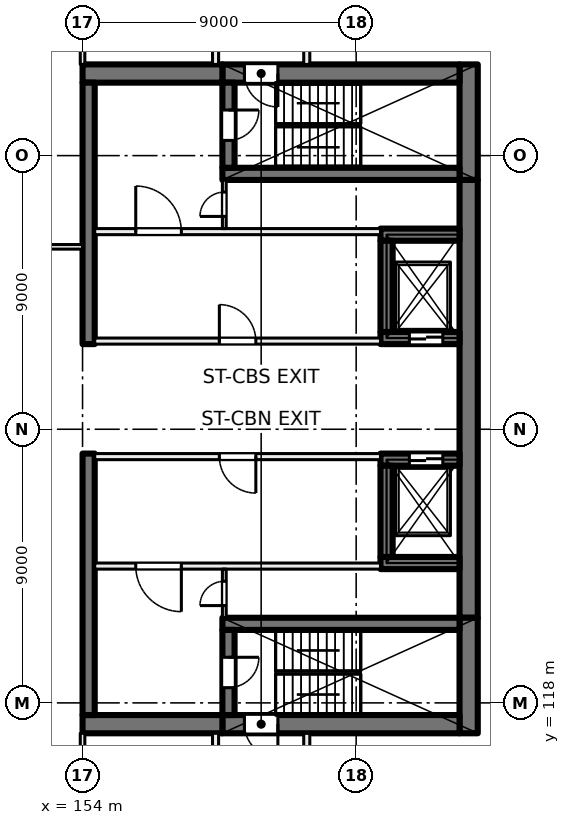
"""IFC4 building model, lengths in metres.
Left out: names, types, materials, properties, quantities, classifications, styles, units other than length and angle.
Written with IfcOpenShell. Run it as: python <this file> out.ifc"""

import sys

from ifc_helpers import new_model, si_unit, direction, frame, frame_2d, origin, place, context, subcontext, project, spatial, rectangle, extrude, element, fill, save


model = new_model("IFC4")
c1 = context("Model", 3, precision=1e-05, world=origin(), true_north=direction((0.0, 1.0)))
c2 = subcontext(c1, "Body", "Model", "MODEL_VIEW")
j1 = project(units=[si_unit("LENGTHUNIT", "METRE"), si_unit("PLANEANGLEUNIT", "RADIAN")], contexts=[c1])
p1 = place(None, origin())
s1 = spatial("IfcSite", under=j1, at=p1, CompositionType="ELEMENT")
p2 = place(p1, origin())
s2 = spatial("IfcBuilding", under=s1, at=p2, CompositionType="ELEMENT")
p3 = place(p2, origin())
s3 = spatial("IfcBuildingStorey", under=s2, at=p3, CompositionType="ELEMENT", Elevation=0.0)
p4 = place(p3, frame((166.7, 139.0, 0.0), z_axis=(0.0, 0.0, 1.0), x_axis=(0.0, -1.0, 0.0)))
e1 = element("IfcWall", 1, at=p4, inside=s3, PredefinedType="SHEAR", context=c2, shape_type="SweptSolid", body=[
    extrude(rectangle(XDim=3.8, YDim=0.6, at=frame_2d((1.9, 0.0))), origin(), (0.0, 0.0, 1.0), 7.5),
])
p5 = place(p3, frame((166.7, 135.2, 0.0), z_axis=(0.0, 0.0, 1.0), x_axis=(0.0, -1.0, 0.0)))
e2 = element("IfcWall", 2, at=p5, inside=s3, PredefinedType="SHEAR", context=c2, shape_type="SweptSolid", body=[
    extrude(rectangle(XDim=14.4, YDim=0.6, at=frame_2d((7.2, 0.0))), origin(), (0.0, 0.0, 1.0), 7.5),
])
p6 = place(p3, frame((166.7, 120.8, 0.0), z_axis=(0.0, 0.0, 1.0), x_axis=(0.0, -1.0, 0.0)))
e3 = element("IfcWall", 3, at=p6, inside=s3, PredefinedType="SHEAR", context=c2, shape_type="SweptSolid", body=[
    extrude(rectangle(XDim=3.8, YDim=0.6, at=frame_2d((1.9, 0.0))), origin(), (0.0, 0.0, 1.0), 7.5),
])
p7 = place(p3, frame((166.4, 138.7, 0.0), z_axis=(0.0, 0.0, 1.0), x_axis=(-1.0, 0.0, 0.0)))
e4 = element("IfcWall", 4, at=p7, inside=s3, PredefinedType="SHEAR", context=c2, shape_type="SweptSolid", body=[
    extrude(rectangle(XDim=7.8, YDim=0.6, at=frame_2d((3.9, 0.0))), origin(), (0.0, 0.0, 1.0), 7.5),
])
p8 = place(p7, frame((5.975, 0.0, 0.0)))
e5 = element("IfcOpeningElement", 5, at=p8, cuts=e4, PredefinedType="OPENING", context=c2, shape_type="SweptSolid", body=[
    extrude(rectangle(XDim=1.1, YDim=2.1, at=frame_2d((0.55, 1.05))), frame((0.0, 0.31, 0.0), z_axis=(0.0, -1.0, 0.0), x_axis=(1.0, 0.0, 0.0)), (0.0, 0.0, 1.0), 0.62),
])
p9 = place(p3, frame((166.4, 117.3, 0.0), z_axis=(0.0, 0.0, 1.0), x_axis=(-1.0, 0.0, 0.0)))
e6 = element("IfcWall", 6, at=p9, inside=s3, PredefinedType="SHEAR", context=c2, shape_type="SweptSolid", body=[
    extrude(rectangle(XDim=7.8, YDim=0.6, at=frame_2d((3.9, 0.0))), origin(), (0.0, 0.0, 1.0), 7.5),
])
p10 = place(p9, frame((5.975, 0.0, 0.0)))
e7 = element("IfcOpeningElement", 7, at=p10, cuts=e6, PredefinedType="OPENING", context=c2, shape_type="SweptSolid", body=[
    extrude(rectangle(XDim=1.1, YDim=2.1, at=frame_2d((0.55, 1.05))), frame((0.0, 0.31, 0.0), z_axis=(0.0, -1.0, 0.0), x_axis=(1.0, 0.0, 0.0)), (0.0, 0.0, 1.0), 0.62),
])
for number, where, z_axis, x_axis in (
    (8, (158.6, 138.7, 0.0), (0.0, 0.0, 1.0), (-1.0, 0.0, 0.0)),
    (9, (158.6, 117.3, 0.0), (0.0, 0.0, 1.0), (-1.0, 0.0, 0.0)),
):
    element("IfcWall", number, at=place(p3, frame(where, z_axis=z_axis, x_axis=x_axis)), inside=s3, PredefinedType="SHEAR", context=c2, shape_type="SweptSolid", body=[
        extrude(rectangle(XDim=4.6, YDim=0.6, at=frame_2d((2.3, 0.0))), origin(), (0.0, 0.0, 1.0), 7.5),
    ])
p11 = place(p3, frame((166.4, 135.4, 0.0), z_axis=(0.0, 0.0, 1.0), x_axis=(-1.0, 0.0, 0.0)))
e10 = element("IfcWall", 10, at=p11, inside=s3, PredefinedType="SHEAR", context=c2, shape_type="SweptSolid", body=[
    extrude(rectangle(XDim=7.8, YDim=0.4, at=frame_2d((3.9, 0.0))), origin(), (0.0, 0.0, 1.0), 7.5),
])
p12 = place(p3, frame((158.8, 138.4, 0.0), z_axis=(0.0, 0.0, 1.0), x_axis=(0.0, -1.0, 0.0)))
e11 = element("IfcWall", 11, at=p12, inside=s3, PredefinedType="SHEAR", context=c2, shape_type="SweptSolid", body=[
    extrude(rectangle(XDim=2.8, YDim=0.4, at=frame_2d((1.4, 0.0))), origin(), (0.0, 0.0, 1.0), 7.5),
])
p13 = place(p12, frame((0.9, 0.0, 0.0)))
e12 = element("IfcOpeningElement", 12, at=p13, cuts=e11, PredefinedType="OPENING", context=c2, shape_type="SweptSolid", body=[
    extrude(rectangle(XDim=1.0, YDim=2.1, at=frame_2d((0.5, 1.05))), frame((0.0, 0.21, 0.0), z_axis=(0.0, -1.0, 0.0), x_axis=(1.0, 0.0, 0.0)), (0.0, 0.0, 1.0), 0.42),
])
p14 = place(p3, frame((166.4, 120.6, 0.0), z_axis=(0.0, 0.0, 1.0), x_axis=(-1.0, 0.0, 0.0)))
e13 = element("IfcWall", 13, at=p14, inside=s3, PredefinedType="SHEAR", context=c2, shape_type="SweptSolid", body=[
    extrude(rectangle(XDim=7.8, YDim=0.4, at=frame_2d((3.9, 0.0))), origin(), (0.0, 0.0, 1.0), 7.5),
])
p15 = place(p3, frame((158.8, 120.4, 0.0), z_axis=(0.0, 0.0, 1.0), x_axis=(0.0, -1.0, 0.0)))
e14 = element("IfcWall", 14, at=p15, inside=s3, PredefinedType="SHEAR", context=c2, shape_type="SweptSolid", body=[
    extrude(rectangle(XDim=2.8, YDim=0.4, at=frame_2d((1.4, 0.0))), origin(), (0.0, 0.0, 1.0), 7.5),
])
p16 = place(p15, frame((0.9, 0.0, 0.0)))
e15 = element("IfcOpeningElement", 15, at=p16, cuts=e14, PredefinedType="OPENING", context=c2, shape_type="SweptSolid", body=[
    extrude(rectangle(XDim=1.0, YDim=2.1, at=frame_2d((0.5, 1.05))), frame((0.0, 0.21, 0.0), z_axis=(0.0, -1.0, 0.0), x_axis=(1.0, 0.0, 0.0)), (0.0, 0.0, 1.0), 0.42),
])
p17 = place(p3, frame((166.4, 130.0, 0.0), z_axis=(0.0, 0.0, 1.0), x_axis=(-1.0, 0.0, 0.0)))
e16 = element("IfcWall", 16, at=p17, inside=s3, PredefinedType="SHEAR", context=c2, shape_type="SweptSolid", body=[
    extrude(rectangle(XDim=2.6, YDim=0.4, at=frame_2d((1.3, 0.0))), origin(), (0.0, 0.0, 1.0), 7.5),
])
p18 = place(p17, frame((0.55, 0.0, 0.0)))
e17 = element("IfcOpeningElement", 17, at=p18, cuts=e16, PredefinedType="OPENING", context=c2, shape_type="SweptSolid", body=[
    extrude(rectangle(XDim=1.1, YDim=2.1, at=frame_2d((0.55, 1.05))), frame((0.0, 0.21, 0.0), z_axis=(0.0, -1.0, 0.0), x_axis=(1.0, 0.0, 0.0)), (0.0, 0.0, 1.0), 0.42),
])
p19 = place(p3, frame((166.4, 133.4, 0.0), z_axis=(0.0, 0.0, 1.0), x_axis=(-1.0, 0.0, 0.0)))
e18 = element("IfcWall", 18, at=p19, inside=s3, PredefinedType="SHEAR", context=c2, shape_type="SweptSolid", body=[
    extrude(rectangle(XDim=2.6, YDim=0.4, at=frame_2d((1.3, 0.0))), origin(), (0.0, 0.0, 1.0), 7.5),
])
p20 = place(p3, frame((164.0, 133.2, 0.0), z_axis=(0.0, 0.0, 1.0), x_axis=(0.0, -1.0, 0.0)))
e19 = element("IfcWall", 19, at=p20, inside=s3, PredefinedType="SHEAR", context=c2, shape_type="SweptSolid", body=[
    extrude(rectangle(XDim=3.0, YDim=0.4, at=frame_2d((1.5, 0.0))), origin(), (0.0, 0.0, 1.0), 7.5),
])
p21 = place(p3, frame((166.4, 126.0, 0.0), z_axis=(0.0, 0.0, 1.0), x_axis=(-1.0, 0.0, 0.0)))
e20 = element("IfcWall", 20, at=p21, inside=s3, PredefinedType="SHEAR", context=c2, shape_type="SweptSolid", body=[
    extrude(rectangle(XDim=2.6, YDim=0.4, at=frame_2d((1.3, 0.0))), origin(), (0.0, 0.0, 1.0), 7.5),
])
p22 = place(p21, frame((0.55, 0.0, 0.0)))
e21 = element("IfcOpeningElement", 21, at=p22, cuts=e20, PredefinedType="OPENING", context=c2, shape_type="SweptSolid", body=[
    extrude(rectangle(XDim=1.1, YDim=2.1, at=frame_2d((0.55, 1.05))), frame((0.0, 0.21, 0.0), z_axis=(0.0, -1.0, 0.0), x_axis=(1.0, 0.0, 0.0)), (0.0, 0.0, 1.0), 0.42),
])
p23 = place(p3, frame((166.4, 122.6, 0.0), z_axis=(0.0, 0.0, 1.0), x_axis=(-1.0, 0.0, 0.0)))
e22 = element("IfcWall", 22, at=p23, inside=s3, PredefinedType="SHEAR", context=c2, shape_type="SweptSolid", body=[
    extrude(rectangle(XDim=2.6, YDim=0.4, at=frame_2d((1.3, 0.0))), origin(), (0.0, 0.0, 1.0), 7.5),
])
p24 = place(p3, frame((164.0, 125.8, 0.0), z_axis=(0.0, 0.0, 1.0), x_axis=(0.0, -1.0, 0.0)))
e23 = element("IfcWall", 23, at=p24, inside=s3, PredefinedType="SHEAR", context=c2, shape_type="SweptSolid", body=[
    extrude(rectangle(XDim=3.0, YDim=0.4, at=frame_2d((1.5, 0.0))), origin(), (0.0, 0.0, 1.0), 7.5),
])
for number, where, z_axis, x_axis in (
    (24, (154.2, 138.4, 0.0), (0.0, 0.0, 1.0), (0.0, -1.0, 0.0)),
    (25, (154.2, 126.2, 0.0), (0.0, 0.0, 1.0), (0.0, -1.0, 0.0)),
):
    element("IfcWall", number, at=place(p3, frame(where, z_axis=z_axis, x_axis=x_axis)), inside=s3, PredefinedType="SHEAR", context=c2, shape_type="SweptSolid", body=[
        extrude(rectangle(XDim=8.6, YDim=0.4, at=frame_2d((4.3, 0.0))), origin(), (0.0, 0.0, 1.0), 7.5),
    ])
p25 = place(p3, frame((163.8, 126.1, 0.0), z_axis=(0.0, 0.0, 1.0), x_axis=(-1.0, 0.0, 0.0)))
e26 = element("IfcWall", 26, at=p25, inside=s3, PredefinedType="PARTITIONING", context=c2, shape_type="SweptSolid", body=[
    extrude(rectangle(XDim=9.4, YDim=0.2, at=frame_2d((4.7, 0.0))), origin(), (0.0, 0.0, 1.0), 7.1),
])
p26 = place(p25, frame((4.1, 0.0, 0.0)))
e27 = element("IfcOpeningElement", 27, at=p26, cuts=e26, PredefinedType="OPENING", context=c2, shape_type="SweptSolid", body=[
    extrude(rectangle(XDim=1.2, YDim=2.1, at=frame_2d((0.6, 1.05))), frame((0.0, 0.11, 0.0), z_axis=(0.0, -1.0, 0.0), x_axis=(1.0, 0.0, 0.0)), (0.0, 0.0, 1.0), 0.22),
])
p27 = place(p3, frame((163.8, 122.5, 0.0), z_axis=(0.0, 0.0, 1.0), x_axis=(-1.0, 0.0, 0.0)))
e28 = element("IfcWall", 28, at=p27, inside=s3, PredefinedType="PARTITIONING", context=c2, shape_type="SweptSolid", body=[
    extrude(rectangle(XDim=9.4, YDim=0.2, at=frame_2d((4.7, 0.0))), origin(), (0.0, 0.0, 1.0), 7.1),
])
p28 = place(p27, frame((6.55, 0.0, 0.0)))
e29 = element("IfcOpeningElement", 29, at=p28, cuts=e28, PredefinedType="OPENING", context=c2, shape_type="SweptSolid", body=[
    extrude(rectangle(XDim=1.5, YDim=2.1, at=frame_2d((0.75, 1.05))), frame((0.0, 0.11, 0.0), z_axis=(0.0, -1.0, 0.0), x_axis=(1.0, 0.0, 0.0)), (0.0, 0.0, 1.0), 0.22),
])
p29 = place(p3, frame((158.663, 120.8, 0.0), z_axis=(0.0, 0.0, 1.0), x_axis=(0.0, 1.0, 0.0)))
e30 = element("IfcWall", 30, at=p29, inside=s3, PredefinedType="PARTITIONING", context=c2, shape_type="SweptSolid", body=[
    extrude(rectangle(XDim=1.6, YDim=0.125, at=frame_2d((0.8, 0.0))), origin(), (0.0, 0.0, 1.0), 7.1),
])
p30 = place(p29, frame((0.4, 0.0, 0.0)))
e31 = element("IfcOpeningElement", 31, at=p30, cuts=e30, PredefinedType="OPENING", context=c2, shape_type="SweptSolid", body=[
    extrude(rectangle(XDim=0.8, YDim=2.1, at=frame_2d((0.4, 1.05))), frame((0.0, 0.073, 0.0), z_axis=(0.0, -1.0, 0.0), x_axis=(1.0, 0.0, 0.0)), (0.0, 0.0, 1.0), 0.145),
])
p31 = place(p3, frame((154.4, 129.9, 0.0), z_axis=(0.0, 0.0, 1.0), x_axis=(1.0, 0.0, 0.0)))
e32 = element("IfcWall", 32, at=p31, inside=s3, PredefinedType="PARTITIONING", context=c2, shape_type="SweptSolid", body=[
    extrude(rectangle(XDim=9.4, YDim=0.2, at=frame_2d((4.7, 0.0))), origin(), (0.0, 0.0, 1.0), 7.1),
])
p32 = place(p31, frame((4.1, 0.0, 0.0)))
e33 = element("IfcOpeningElement", 33, at=p32, cuts=e32, PredefinedType="OPENING", context=c2, shape_type="SweptSolid", body=[
    extrude(rectangle(XDim=1.2, YDim=2.1, at=frame_2d((0.6, 1.05))), frame((0.0, 0.11, 0.0), z_axis=(0.0, -1.0, 0.0), x_axis=(1.0, 0.0, 0.0)), (0.0, 0.0, 1.0), 0.22),
])
p33 = place(p3, frame((154.4, 133.5, 0.0), z_axis=(0.0, 0.0, 1.0), x_axis=(1.0, 0.0, 0.0)))
e34 = element("IfcWall", 34, at=p33, inside=s3, PredefinedType="PARTITIONING", context=c2, shape_type="SweptSolid", body=[
    extrude(rectangle(XDim=9.4, YDim=0.2, at=frame_2d((4.7, 0.0))), origin(), (0.0, 0.0, 1.0), 7.1),
])
p34 = place(p33, frame((1.35, 0.0, 0.0)))
e35 = element("IfcOpeningElement", 35, at=p34, cuts=e34, PredefinedType="OPENING", context=c2, shape_type="SweptSolid", body=[
    extrude(rectangle(XDim=1.5, YDim=2.1, at=frame_2d((0.75, 1.05))), frame((0.0, 0.11, 0.0), z_axis=(0.0, -1.0, 0.0), x_axis=(1.0, 0.0, 0.0)), (0.0, 0.0, 1.0), 0.22),
])
p35 = place(p3, frame((158.663, 133.6, 0.0), z_axis=(0.0, 0.0, 1.0), x_axis=(0.0, 1.0, 0.0)))
e36 = element("IfcWall", 36, at=p35, inside=s3, PredefinedType="PARTITIONING", context=c2, shape_type="SweptSolid", body=[
    extrude(rectangle(XDim=1.6, YDim=0.125, at=frame_2d((0.8, 0.0))), origin(), (0.0, 0.0, 1.0), 7.1),
])
p36 = place(p35, frame((0.4, 0.0, 0.0)))
e37 = element("IfcOpeningElement", 37, at=p36, cuts=e36, PredefinedType="OPENING", context=c2, shape_type="SweptSolid", body=[
    extrude(rectangle(XDim=0.8, YDim=2.1, at=frame_2d((0.4, 1.05))), frame((0.0, 0.073, 0.0), z_axis=(0.0, -1.0, 0.0), x_axis=(1.0, 0.0, 0.0)), (0.0, 0.0, 1.0), 0.145),
])
p37 = place(p3, frame((140.0, 133.0, 0.0), z_axis=(0.0, 0.0, 1.0), x_axis=(1.0, 0.0, 0.0)))
e38 = element("IfcWall", 38, at=p37, inside=s3, PredefinedType="PARTITIONING", context=c2, shape_type="SweptSolid", body=[
    extrude(rectangle(XDim=14.0, YDim=0.15, at=frame_2d((7.0, 0.0))), origin(), (0.0, 0.0, 1.0), 7.1),
])
p38 = place(p37, frame((6.1, 0.0, 0.0)))
e39 = element("IfcOpeningElement", 39, at=p38, cuts=e38, PredefinedType="OPENING", context=c2, shape_type="SweptSolid", body=[
    extrude(rectangle(XDim=1.8, YDim=2.1, at=frame_2d((0.9, 1.05))), frame((0.0, 0.085, 0.0), z_axis=(0.0, -1.0, 0.0), x_axis=(1.0, 0.0, 0.0)), (0.0, 0.0, 1.0), 0.17),
])
p39 = place(p3, frame((154.0, 117.0, 0.0), z_axis=(0.0, 0.0, 1.0), x_axis=(0.0, -1.0, 0.0)))
e40 = element("IfcWall", 40, at=p39, inside=s3, PredefinedType="PARTITIONING", context=c2, shape_type="SweptSolid", body=[
    extrude(rectangle(XDim=13.925, YDim=0.15, at=frame_2d((6.962, 0.0))), origin(), (0.0, 0.0, 1.0), 7.1),
])
p40 = place(p39, frame((6.5, 0.0, 0.0)))
e41 = element("IfcOpeningElement", 41, at=p40, cuts=e40, PredefinedType="OPENING", context=c2, shape_type="SweptSolid", body=[
    extrude(rectangle(XDim=1.0, YDim=2.1, at=frame_2d((0.5, 1.05))), frame((0.0, 0.085, 0.0), z_axis=(0.0, -1.0, 0.0), x_axis=(1.0, 0.0, 0.0)), (0.0, 0.0, 1.0), 0.17),
])
p41 = place(p3, frame((154.0, 139.0, 0.0), z_axis=(0.0, 0.0, 1.0), x_axis=(0.0, 1.0, 0.0)))
e42 = element("IfcWall", 42, at=p41, inside=s3, PredefinedType="PARTITIONING", context=c2, shape_type="SweptSolid", body=[
    extrude(rectangle(XDim=14.4, YDim=0.15, at=frame_2d((7.2, 0.0))), origin(), (0.0, 0.0, 1.0), 7.1),
])
p42 = place(p3, frame((158.375, 102.6, 0.0), z_axis=(0.0, 0.0, 1.0), x_axis=(0.0, 1.0, 0.0)))
e43 = element("IfcWall", 43, at=p42, inside=s3, PredefinedType="PARTITIONING", context=c2, shape_type="SweptSolid", body=[
    extrude(rectangle(XDim=14.4, YDim=0.2, at=frame_2d((7.2, 0.0))), origin(), (0.0, 0.0, 1.0), 7.1),
])
p43 = place(p3, frame((158.375, 139.0, 0.0), z_axis=(0.0, 0.0, 1.0), x_axis=(0.0, 1.0, 0.0)))
e44 = element("IfcWall", 44, at=p43, inside=s3, PredefinedType="PARTITIONING", context=c2, shape_type="SweptSolid", body=[
    extrude(rectangle(XDim=14.4, YDim=0.2, at=frame_2d((7.2, 0.0))), origin(), (0.0, 0.0, 1.0), 7.1),
])
p44 = place(p43, frame((7.1, 0.0, 0.0)))
e45 = element("IfcOpeningElement", 45, at=p44, cuts=e44, PredefinedType="OPENING", context=c2, shape_type="SweptSolid", body=[
    extrude(rectangle(XDim=1.0, YDim=2.1, at=frame_2d((0.5, 1.05))), frame((0.0, 0.11, 0.0), z_axis=(0.0, -1.0, 0.0), x_axis=(1.0, 0.0, 0.0)), (0.0, 0.0, 1.0), 0.22),
])
for number, where, z_axis, x_axis in (
    (46, (161.375, 112.0, 0.0), (0.0, 0.0, 1.0), (0.0, 1.0, 0.0)),
    (47, (161.375, 139.0, 0.0), (0.0, 0.0, 1.0), (0.0, 1.0, 0.0)),
):
    element("IfcWall", number, at=place(p3, frame(where, z_axis=z_axis, x_axis=x_axis)), inside=s3, PredefinedType="PARTITIONING", context=c2, shape_type="SweptSolid", body=[
        extrude(rectangle(XDim=5.0, YDim=0.2, at=frame_2d((2.5, 0.0))), origin(), (0.0, 0.0, 1.0), 7.1),
    ])
p45 = place(p22, origin())
e48 = element("IfcDoor", 48, at=p45, inside=s3, OperationType="DOUBLE_DOOR_SLIDING", PredefinedType="DOOR", context=c2, shape_type="SweptSolid", body=[
    extrude(rectangle(XDim=1.1, YDim=2.1, at=frame_2d((0.55, 1.05))), frame((0.0, 0.025, 0.0), z_axis=(0.0, -1.0, 0.0), x_axis=(1.0, 0.0, 0.0)), (0.0, 0.0, 1.0), 0.05),
])
fill(e21, e48)
p46 = place(p18, origin())
e49 = element("IfcDoor", 49, at=p46, inside=s3, OperationType="DOUBLE_DOOR_SLIDING", PredefinedType="DOOR", context=c2, shape_type="SweptSolid", body=[
    extrude(rectangle(XDim=1.1, YDim=2.1, at=frame_2d((0.55, 1.05))), frame((0.0, 0.025, 0.0), z_axis=(0.0, -1.0, 0.0), x_axis=(1.0, 0.0, 0.0)), (0.0, 0.0, 1.0), 0.05),
])
fill(e17, e49)
p47 = place(p26, origin())
e50 = element("IfcDoor", 50, at=p47, inside=s3, OperationType="DOUBLE_DOOR_SINGLE_SWING", PredefinedType="DOOR", context=c2, shape_type="SweptSolid", body=[
    extrude(rectangle(XDim=1.2, YDim=2.1, at=frame_2d((0.6, 1.05))), frame((0.0, 0.025, 0.0), z_axis=(0.0, -1.0, 0.0), x_axis=(1.0, 0.0, 0.0)), (0.0, 0.0, 1.0), 0.05),
])
fill(e27, e50)
p48 = place(p28, origin())
e51 = element("IfcDoor", 51, at=p48, inside=s3, OperationType="DOUBLE_DOOR_SINGLE_SWING", PredefinedType="DOOR", context=c2, shape_type="SweptSolid", body=[
    extrude(rectangle(XDim=1.5, YDim=2.1, at=frame_2d((0.75, 1.05))), frame((0.0, 0.025, 0.0), z_axis=(0.0, -1.0, 0.0), x_axis=(1.0, 0.0, 0.0)), (0.0, 0.0, 1.0), 0.05),
])
fill(e29, e51)
p49 = place(p16, origin())
e52 = element("IfcDoor", 52, at=p49, inside=s3, OperationType="SINGLE_SWING_LEFT", PredefinedType="DOOR", context=c2, shape_type="SweptSolid", body=[
    extrude(rectangle(XDim=1.0, YDim=2.1, at=frame_2d((0.5, 1.05))), frame((0.0, 0.025, 0.0), z_axis=(0.0, -1.0, 0.0), x_axis=(1.0, 0.0, 0.0)), (0.0, 0.0, 1.0), 0.05),
])
fill(e15, e52)
p50 = place(p30, origin())
e53 = element("IfcDoor", 53, at=p50, inside=s3, OperationType="SINGLE_SWING_RIGHT", PredefinedType="DOOR", context=c2, shape_type="SweptSolid", body=[
    extrude(rectangle(XDim=0.8, YDim=2.1, at=frame_2d((0.4, 1.05))), frame((0.0, 0.025, 0.0), z_axis=(0.0, -1.0, 0.0), x_axis=(1.0, 0.0, 0.0)), (0.0, 0.0, 1.0), 0.05),
])
fill(e31, e53)
p51 = place(p32, origin())
e54 = element("IfcDoor", 54, at=p51, inside=s3, OperationType="DOUBLE_DOOR_SINGLE_SWING", PredefinedType="DOOR", context=c2, shape_type="SweptSolid", body=[
    extrude(rectangle(XDim=1.2, YDim=2.1, at=frame_2d((0.6, 1.05))), frame((0.0, 0.025, 0.0), z_axis=(0.0, -1.0, 0.0), x_axis=(1.0, 0.0, 0.0)), (0.0, 0.0, 1.0), 0.05),
])
fill(e33, e54)
p52 = place(p34, origin())
e55 = element("IfcDoor", 55, at=p52, inside=s3, OperationType="DOUBLE_DOOR_SINGLE_SWING", PredefinedType="DOOR", context=c2, shape_type="SweptSolid", body=[
    extrude(rectangle(XDim=1.5, YDim=2.1, at=frame_2d((0.75, 1.05))), frame((0.0, 0.025, 0.0), z_axis=(0.0, -1.0, 0.0), x_axis=(1.0, 0.0, 0.0)), (0.0, 0.0, 1.0), 0.05),
])
fill(e35, e55)
p53 = place(p13, origin())
e56 = element("IfcDoor", 56, at=p53, inside=s3, OperationType="SINGLE_SWING_RIGHT", PredefinedType="DOOR", context=c2, shape_type="SweptSolid", body=[
    extrude(rectangle(XDim=1.0, YDim=2.1, at=frame_2d((0.5, 1.05))), frame((0.0, 0.025, 0.0), z_axis=(0.0, -1.0, 0.0), x_axis=(1.0, 0.0, 0.0)), (0.0, 0.0, 1.0), 0.05),
])
fill(e12, e56)
p54 = place(p36, origin())
e57 = element("IfcDoor", 57, at=p54, inside=s3, OperationType="SINGLE_SWING_LEFT", PredefinedType="DOOR", context=c2, shape_type="SweptSolid", body=[
    extrude(rectangle(XDim=0.8, YDim=2.1, at=frame_2d((0.4, 1.05))), frame((0.0, 0.025, 0.0), z_axis=(0.0, -1.0, 0.0), x_axis=(1.0, 0.0, 0.0)), (0.0, 0.0, 1.0), 0.05),
])
fill(e37, e57)
p55 = place(p8, origin())
e58 = element("IfcDoor", 58, at=p55, inside=s3, OperationType="SINGLE_SWING_LEFT", PredefinedType="DOOR", context=c2, shape_type="SweptSolid", body=[
    extrude(rectangle(XDim=1.1, YDim=2.1, at=frame_2d((0.55, 1.05))), frame((0.0, 0.025, 0.0), z_axis=(0.0, -1.0, 0.0), x_axis=(1.0, 0.0, 0.0)), (0.0, 0.0, 1.0), 0.05),
])
fill(e5, e58)
p56 = place(p10, origin())
e59 = element("IfcDoor", 59, at=p56, inside=s3, OperationType="SINGLE_SWING_LEFT", PredefinedType="DOOR", context=c2, shape_type="SweptSolid", body=[
    extrude(rectangle(XDim=1.1, YDim=2.1, at=frame_2d((0.55, 1.05))), frame((0.0, 0.025, 0.0), z_axis=(0.0, -1.0, 0.0), x_axis=(1.0, 0.0, 0.0)), (0.0, 0.0, 1.0), 0.05),
])
fill(e7, e59)
save(model, sys.argv[1])
